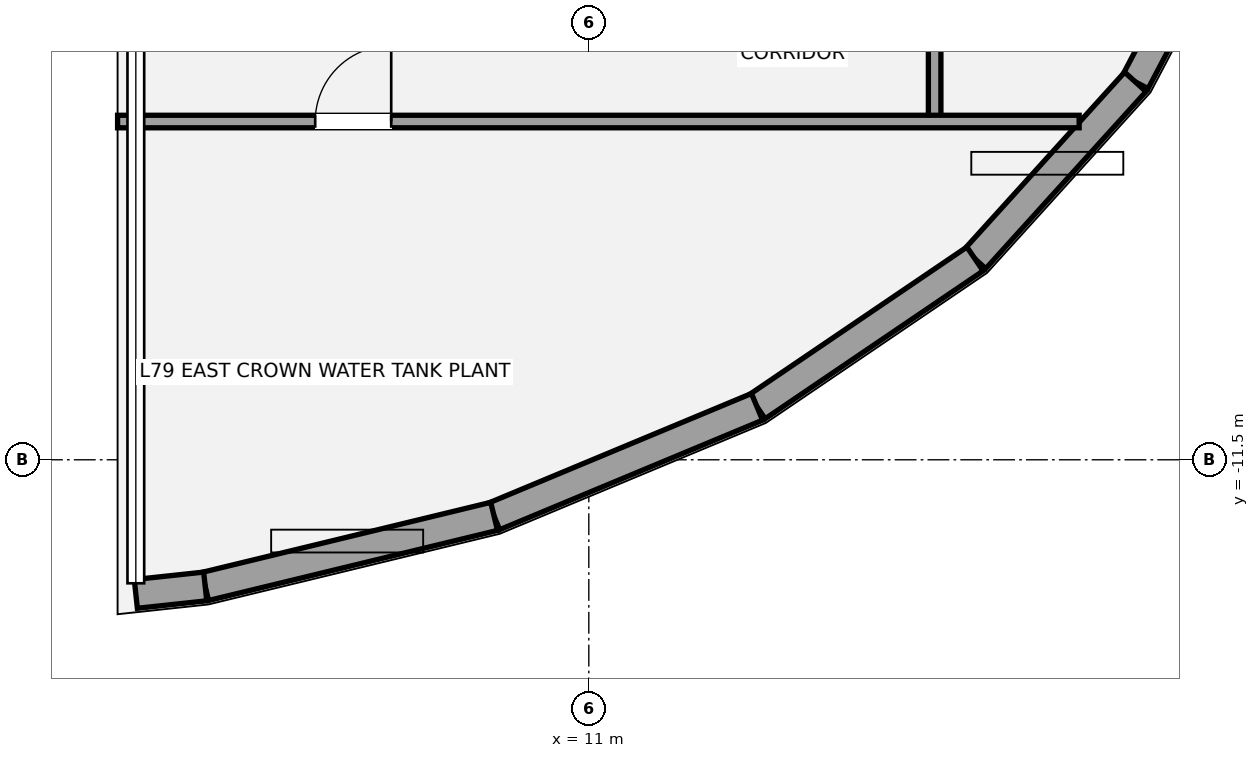
"""IFC4 building model, lengths in metres.
Left out: names, types, materials, properties, quantities, classifications, styles, units other than length and angle.
Written with IfcOpenShell. Run it as: python <this file> out.ifc"""

import sys

from ifc_helpers import new_model, si_unit, direction, frame, frame_2d, origin, place, context, subcontext, project, spatial, rectangle, extrude, element, fill, save


model = new_model("IFC4")
c1 = context("Model", 3, precision=1e-05, world=origin(), true_north=direction((0.0, 1.0)))
c2 = subcontext(c1, "Body", "Model", "MODEL_VIEW")
j1 = project(units=[si_unit("LENGTHUNIT", "METRE"), si_unit("PLANEANGLEUNIT", "RADIAN")], contexts=[c1])
p1 = place(None, origin())
s1 = spatial("IfcSite", under=j1, at=p1, CompositionType="ELEMENT")
p2 = place(p1, origin())
s2 = spatial("IfcBuilding", under=s1, at=p2, CompositionType="ELEMENT")
p3 = place(p2, frame((0.0, 0.0, 280.6)))
s3 = spatial("IfcBuildingStorey", under=s2, at=p3, CompositionType="ELEMENT", Elevation=280.6)
p4 = place(p3, frame((18.191, -6.529, 0.0), z_axis=(0.0, 0.0, 1.0), x_axis=(0.466239076721, 0.884658760957, 0.0)))
e1 = element("IfcWall", 1, at=p4, inside=s3, PredefinedType="ELEMENTEDWALL", context=c2, shape_type="SweptSolid", body=[
    extrude(rectangle(XDim=2.879, YDim=0.38, at=frame_2d((1.44, 0.0))), origin(), (0.0, 0.0, 1.0), 2.97),
])
p5 = place(p3, frame((16.082, -8.858, 0.0), z_axis=(0.0, 0.0, 1.0), x_axis=(0.671159432859, 0.741313034881, 0.0)))
e2 = element("IfcWall", 2, at=p5, inside=s3, PredefinedType="ELEMENTEDWALL", context=c2, shape_type="SweptSolid", body=[
    extrude(rectangle(XDim=3.143, YDim=0.38, at=frame_2d((1.571, 0.0))), origin(), (0.0, 0.0, 1.0), 2.97),
])
p6 = place(p3, frame((13.213, -10.804, 0.0), z_axis=(0.0, 0.0, 1.0), x_axis=(0.827591474152, 0.561330875608, 0.0)))
e3 = element("IfcWall", 3, at=p6, inside=s3, PredefinedType="ELEMENTEDWALL", context=c2, shape_type="SweptSolid", body=[
    extrude(rectangle(XDim=3.466, YDim=0.38, at=frame_2d((1.733, 0.0))), origin(), (0.0, 0.0, 1.0), 2.97),
])
p7 = place(p3, frame((9.754, -12.245, 0.0), z_axis=(0.0, 0.0, 1.0), x_axis=(0.923107762436, 0.384541361794, 0.0)))
e4 = element("IfcWall", 4, at=p7, inside=s3, PredefinedType="ELEMENTEDWALL", context=c2, shape_type="SweptSolid", body=[
    extrude(rectangle(XDim=3.747, YDim=0.38, at=frame_2d((1.874, 0.0))), origin(), (0.0, 0.0, 1.0), 2.97),
])
p8 = place(p3, frame((5.953, -13.167, 0.0), z_axis=(0.0, 0.0, 1.0), x_axis=(0.971829314356, 0.235685773347, 0.0)))
e5 = element("IfcWall", 5, at=p8, inside=s3, PredefinedType="ELEMENTEDWALL", context=c2, shape_type="SweptSolid", body=[
    extrude(rectangle(XDim=3.911, YDim=0.38, at=frame_2d((1.956, 0.0))), origin(), (0.0, 0.0, 1.0), 2.97),
])
p9 = place(p3, frame((5.04, -13.265, 0.0), z_axis=(0.0, 0.0, 1.0), x_axis=(0.994241555016, 0.107162168139, 0.0)))
e6 = element("IfcWall", 6, at=p9, inside=s3, PredefinedType="ELEMENTEDWALL", context=c2, shape_type="SweptSolid", body=[
    extrude(rectangle(XDim=0.918, YDim=0.38, at=frame_2d((0.459, 0.0))), origin(), (0.0, 0.0, 1.0), 2.97),
])
p10 = place(p3, frame((15.55, -7.05, 0.0), z_axis=(0.0, 0.0, 1.0), x_axis=(0.0, 1.0, 0.0)))
e7 = element("IfcWall", 7, at=p10, inside=s3, PredefinedType="PARTITIONING", context=c2, shape_type="SweptSolid", body=[
    extrude(rectangle(XDim=14.7, YDim=0.165, at=frame_2d((7.35, 0.0))), origin(), (0.0, 0.0, 1.0), 2.987),
])
p11 = place(p10, frame((1.8, 0.0, 0.0)))
e8 = element("IfcOpeningElement", 8, at=p11, cuts=e7, PredefinedType="OPENING", context=c2, shape_type="SweptSolid", body=[
    extrude(rectangle(XDim=1.0, YDim=2.15, at=frame_2d((0.5, 1.075))), frame((0.0, 0.093, 0.0), z_axis=(0.0, -1.0, 0.0), x_axis=(1.0, 0.0, 0.0)), (0.0, 0.0, 1.0), 0.185),
])
p12 = place(p10, frame((7.28, 0.0, 0.0)))
e9 = element("IfcOpeningElement", 9, at=p12, cuts=e7, PredefinedType="OPENING", context=c2, shape_type="SweptSolid", body=[
    extrude(rectangle(XDim=1.0, YDim=2.15, at=frame_2d((0.5, 1.075))), frame((0.0, 0.093, 0.0), z_axis=(0.0, -1.0, 0.0), x_axis=(1.0, 0.0, 0.0)), (0.0, 0.0, 1.0), 0.185),
])
p13 = place(p10, frame((11.6, 0.0, 0.0)))
e10 = element("IfcOpeningElement", 10, at=p13, cuts=e7, PredefinedType="OPENING", context=c2, shape_type="SweptSolid", body=[
    extrude(rectangle(XDim=1.0, YDim=2.15, at=frame_2d((0.5, 1.075))), frame((0.0, 0.093, 0.0), z_axis=(0.0, -1.0, 0.0), x_axis=(1.0, 0.0, 0.0)), (0.0, 0.0, 1.0), 0.185),
])
p14 = place(p3, frame((4.8, -7.05, 0.0), z_axis=(0.0, 0.0, 1.0), x_axis=(1.0, 0.0, 0.0)))
e11 = element("IfcWall", 11, at=p14, inside=s3, PredefinedType="PARTITIONING", context=c2, shape_type="SweptSolid", body=[
    extrude(rectangle(XDim=12.651, YDim=0.165, at=frame_2d((6.326, 0.0))), origin(), (0.0, 0.0, 1.0), 2.968),
])
p15 = place(p14, frame((2.6, 0.0, 0.0)))
e12 = element("IfcOpeningElement", 12, at=p15, cuts=e11, PredefinedType="OPENING", context=c2, shape_type="SweptSolid", body=[
    extrude(rectangle(XDim=1.0, YDim=2.15, at=frame_2d((0.5, 1.075))), frame((0.0, 0.093, 0.0), z_axis=(0.0, -1.0, 0.0), x_axis=(1.0, 0.0, 0.0)), (0.0, 0.0, 1.0), 0.185),
])
p16 = place(p15, origin())
e13 = element("IfcDoor", 13, at=p16, inside=s3, OperationType="SINGLE_SWING_RIGHT", PredefinedType="DOOR", context=c2, shape_type="SweptSolid", body=[
    extrude(rectangle(XDim=1.0, YDim=2.15, at=frame_2d((0.5, 1.075))), frame((0.0, 0.025, 0.0), z_axis=(0.0, -1.0, 0.0), x_axis=(1.0, 0.0, 0.0)), (0.0, 0.0, 1.0), 0.05),
])
fill(e12, e13)
save(model, sys.argv[1])
